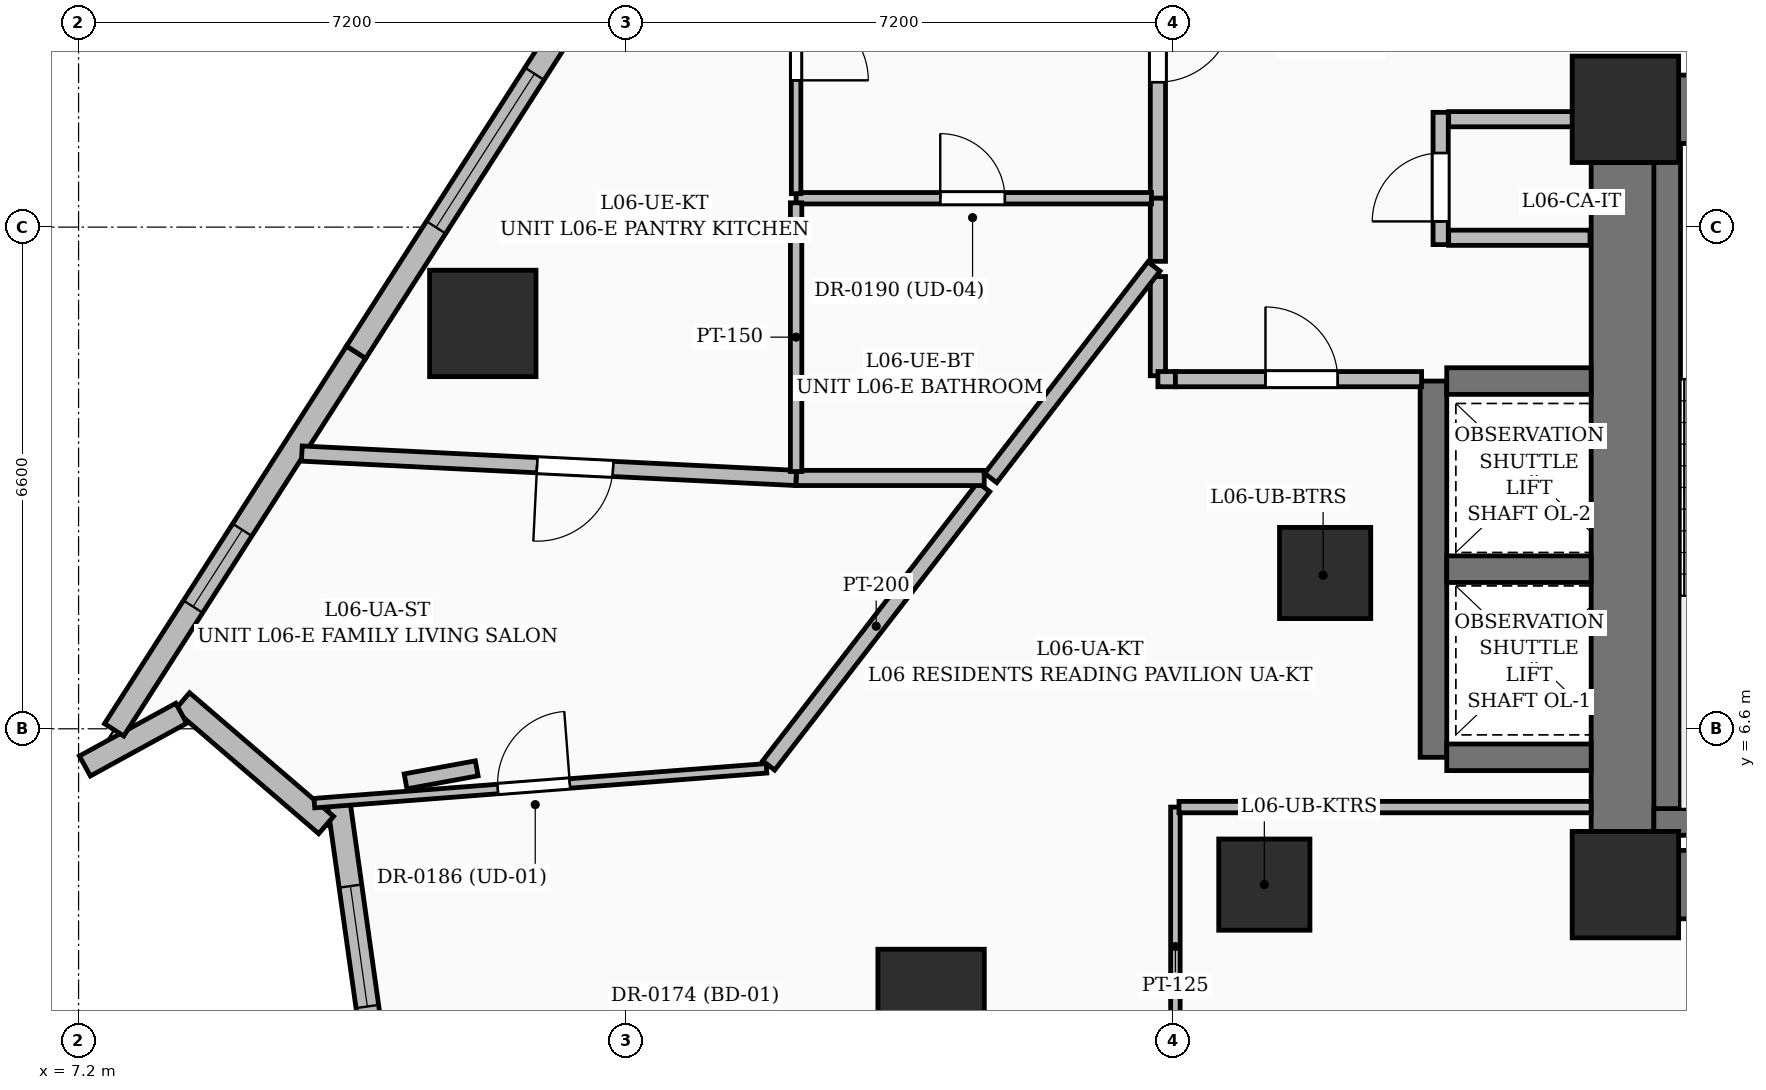
"""IFC4 building model, lengths in metres.
Left out: names, types, materials, properties, quantities, classifications, styles, units other than length and angle.
Written with IfcOpenShell. Run it as: python <this file> out.ifc"""

import sys

from ifc_helpers import new_model, si_unit, direction, frame, frame_2d, origin, origin_2d, place, context, subcontext, project, spatial, rectangle, extrude, element, fill, save


model = new_model("IFC4")
c1 = context("Model", 3, precision=1e-05, world=origin(), true_north=direction((0.0, 1.0)))
c2 = subcontext(c1, "Body", "Model", "MODEL_VIEW")
j1 = project(units=[si_unit("LENGTHUNIT", "METRE"), si_unit("PLANEANGLEUNIT", "RADIAN")], contexts=[c1])
p1 = place(None, origin())
s1 = spatial("IfcSite", under=j1, at=p1, CompositionType="ELEMENT")
p2 = place(p1, origin())
s2 = spatial("IfcBuilding", under=s1, at=p2, CompositionType="ELEMENT")
p3 = place(p2, frame((0.0, 0.0, 31.8)))
s3 = spatial("IfcBuildingStorey", under=s2, at=p3, CompositionType="ELEMENT", Elevation=31.8)
for number, where, z_axis, x_axis in (
    (1, (27.55, 4.55, 0.0), (0.0, 0.0, 1.0), (1.0, 0.0, 0.0)),
    (2, (27.55, 14.75, 0.0), (0.0, 0.0, 1.0), (1.0, 0.0, 0.0)),
):
    element("IfcColumn", number, at=place(p3, frame(where, z_axis=z_axis, x_axis=x_axis)), inside=s3, PredefinedType="COLUMN", context=c2, shape_type="SweptSolid", body=[
        extrude(rectangle(XDim=1.4, YDim=1.4, at=origin_2d()), origin(), (0.0, 0.0, 1.0), 3.6),
    ])
for number, where, z_axis, x_axis in (
    (3, (22.8, 4.55, 0.0), (0.0, 0.0, 1.0), (1.0, 0.0, 0.0)),
    (4, (23.6, 8.65, 0.0), (0.0, 0.0, 1.0), (1.0, 0.0, 0.0)),
):
    element("IfcColumn", number, at=place(p3, frame(where, z_axis=z_axis, x_axis=x_axis)), inside=s3, PredefinedType="COLUMN", context=c2, shape_type="SweptSolid", body=[
        extrude(rectangle(XDim=1.2, YDim=1.2, at=origin_2d()), origin(), (0.0, 0.0, 1.0), 3.6),
    ])
p4 = place(p3, frame((28.25, 4.55, 0.0), z_axis=(0.0, 0.0, 1.0), x_axis=(1.0, 0.0, 0.0)))
e5 = element("IfcWall", 5, at=p4, inside=s3, PredefinedType="SHEAR", context=c2, shape_type="SweptSolid", body=[
    extrude(rectangle(XDim=6.2, YDim=0.9, at=frame_2d((3.1, 0.0))), origin(), (0.0, 0.0, 1.0), 3.6),
])
p5 = place(p3, frame((28.25, 14.75, 0.0), z_axis=(0.0, 0.0, 1.0), x_axis=(1.0, 0.0, 0.0)))
e6 = element("IfcWall", 6, at=p5, inside=s3, PredefinedType="SHEAR", context=c2, shape_type="SweptSolid", body=[
    extrude(rectangle(XDim=6.2, YDim=0.9, at=frame_2d((3.1, 0.0))), origin(), (0.0, 0.0, 1.0), 3.6),
])
p6 = place(p5, frame((0.925, 0.0, 0.0)))
e7 = element("IfcOpeningElement", 7, at=p6, cuts=e6, PredefinedType="OPENING", context=c2, shape_type="SweptSolid", body=[
    extrude(rectangle(XDim=1.05, YDim=2.15, at=frame_2d((0.525, 1.075))), frame((0.0, 0.46, 0.0), z_axis=(0.0, -1.0, 0.0), x_axis=(1.0, 0.0, 0.0)), (0.0, 0.0, 1.0), 0.92),
])
p7 = place(p3, frame((27.55, 5.25, 0.0), z_axis=(0.0, 0.0, 1.0), x_axis=(0.0, 1.0, 0.0)))
e8 = element("IfcWall", 8, at=p7, inside=s3, PredefinedType="SHEAR", context=c2, shape_type="SweptSolid", body=[
    extrude(rectangle(XDim=8.8, YDim=0.9, at=frame_2d((4.4, 0.0))), origin(), (0.0, 0.0, 1.0), 3.6),
])
p8 = place(p3, frame((28.1, 5.2, 0.0), z_axis=(0.0, 0.0, 1.0), x_axis=(0.0, 1.0, 0.0)))
e9 = element("IfcWall", 9, at=p8, inside=s3, PredefinedType="SOLIDWALL", context=c2, shape_type="SweptSolid", body=[
    extrude(rectangle(XDim=9.1, YDim=0.35, at=frame_2d((4.55, 0.0))), origin(), (0.0, 0.0, 1.0), 3.6),
])
p9 = place(p3, frame((27.925, 5.375, 0.0), z_axis=(0.0, 0.0, 1.0), x_axis=(1.0, 0.0, 0.0)))
e10 = element("IfcWall", 10, at=p9, inside=s3, PredefinedType="SOLIDWALL", context=c2, shape_type="SweptSolid", body=[
    extrude(rectangle(XDim=3.55, YDim=0.35, at=frame_2d((1.775, 0.0))), origin(), (0.0, 0.0, 1.0), 3.6),
])
p10 = place(p3, frame((25.025, 6.225, 0.0), z_axis=(0.0, 0.0, 1.0), x_axis=(0.0, 1.0, 0.0)))
e11 = element("IfcWall", 11, at=p10, inside=s3, PredefinedType="SOLIDWALL", context=c2, shape_type="SweptSolid", body=[
    extrude(rectangle(XDim=4.95, YDim=0.35, at=frame_2d((2.475, 0.0))), origin(), (0.0, 0.0, 1.0), 3.6),
])
for number, where, z_axis, x_axis in (
    (12, (25.2, 6.225, 0.0), (0.0, 0.0, 1.0), (1.0, 0.0, 0.0)),
    (13, (25.2, 8.7, 0.0), (0.0, 0.0, 1.0), (1.0, 0.0, 0.0)),
    (14, (25.2, 11.175, 0.0), (0.0, 0.0, 1.0), (1.0, 0.0, 0.0)),
):
    element("IfcWall", number, at=place(p3, frame(where, z_axis=z_axis, x_axis=x_axis)), inside=s3, PredefinedType="SOLIDWALL", context=c2, shape_type="SweptSolid", body=[
        extrude(rectangle(XDim=1.9, YDim=0.35, at=frame_2d((0.95, 0.0))), origin(), (0.0, 0.0, 1.0), 3.6),
    ])
for number, where, z_axis, x_axis in (
    (15, (18.416, 3.0, 0.0), (0.0, 0.0, 1.0), (1.0, 0.0, 0.0)),
    (16, (12.518, 11.933, 0.0), (0.0, 0.0, 1.0), (1.0, 0.0, 0.0)),
):
    element("IfcColumn", number, at=place(p3, frame(where, z_axis=z_axis, x_axis=x_axis)), inside=s3, PredefinedType="COLUMN", context=c2, shape_type="SweptSolid", body=[
        extrude(rectangle(XDim=1.4, YDim=1.4, at=origin_2d()), origin(), (0.0, 0.0, 1.0), 3.6),
    ])
p11 = place(p3, frame((11.044, 2.625, 0.0), z_axis=(0.0, 0.0, 1.0), x_axis=(-0.139123594989, 0.99027502509, 0.0)))
e17 = element("IfcWall", 17, at=p11, inside=s3, PredefinedType="SOLIDWALL", context=c2, shape_type="SweptSolid", body=[
    extrude(rectangle(XDim=3.05, YDim=0.3, at=frame_2d((1.525, 0.0))), origin(), (0.0, 0.0, 1.0), 3.35),
])
p12 = place(p11, frame((0.325, 0.0, 0.55)))
e18 = element("IfcOpeningElement", 18, at=p12, cuts=e17, PredefinedType="OPENING", context=c2, shape_type="SweptSolid", body=[
    extrude(rectangle(XDim=1.6, YDim=2.2, at=frame_2d((0.8, 1.1))), frame((0.0, 0.16, 0.0), z_axis=(0.0, -1.0, 0.0), x_axis=(1.0, 0.0, 0.0)), (0.0, 0.0, 1.0), 0.32),
])
p13 = place(p3, frame((10.457, 5.334, 0.0), z_axis=(0.0, 0.0, 1.0), x_axis=(-0.758710972352, 0.651427402273, 0.0)))
e19 = element("IfcWall", 19, at=p13, inside=s3, PredefinedType="SOLIDWALL", context=c2, shape_type="SweptSolid", body=[
    extrude(rectangle(XDim=2.496, YDim=0.3, at=frame_2d((1.248, 0.0))), origin(), (0.0, 0.0, 1.0), 3.35),
])
p14 = place(p3, frame((8.551, 6.804, 0.0), z_axis=(0.0, 0.0, 1.0), x_axis=(-0.877287752989, -0.479964788767, 0.0)))
e20 = element("IfcWall", 20, at=p14, inside=s3, PredefinedType="SOLIDWALL", context=c2, shape_type="SweptSolid", body=[
    extrude(rectangle(XDim=1.445, YDim=0.3, at=frame_2d((0.722, 0.0))), origin(), (0.0, 0.0, 1.0), 3.35),
])
p15 = place(p3, frame((7.668, 6.586, 0.0), z_axis=(0.0, 0.0, 1.0), x_axis=(0.539504449159, 0.841982748836, 0.0)))
e21 = element("IfcWall", 21, at=p15, inside=s3, PredefinedType="SOLIDWALL", context=c2, shape_type="SweptSolid", body=[
    extrude(rectangle(XDim=5.901, YDim=0.3, at=frame_2d((2.95, 0.0))), origin(), (0.0, 0.0, 1.0), 3.35),
])
p16 = place(p15, frame((1.925, 0.0, 0.8)))
e22 = element("IfcOpeningElement", 22, at=p16, cuts=e21, PredefinedType="OPENING", context=c2, shape_type="SweptSolid", body=[
    extrude(rectangle(XDim=1.2, YDim=1.8, at=frame_2d((0.6, 0.9))), frame((0.0, 0.16, 0.0), z_axis=(0.0, -1.0, 0.0), x_axis=(1.0, 0.0, 0.0)), (0.0, 0.0, 1.0), 0.32),
])
p17 = place(p3, frame((10.851, 11.555, 0.0), z_axis=(0.0, 0.0, 1.0), x_axis=(0.539526045631, 0.841968910403, 0.0)))
e23 = element("IfcWall", 23, at=p17, inside=s3, PredefinedType="SOLIDWALL", context=c2, shape_type="SweptSolid", body=[
    extrude(rectangle(XDim=6.526, YDim=0.3, at=frame_2d((3.263, 0.0))), origin(), (0.0, 0.0, 1.0), 3.35),
])
p18 = place(p17, frame((1.95, 0.0, 0.6)))
e24 = element("IfcOpeningElement", 24, at=p18, cuts=e23, PredefinedType="OPENING", context=c2, shape_type="SweptSolid", body=[
    extrude(rectangle(XDim=2.4, YDim=2.1, at=frame_2d((1.2, 1.05))), frame((0.0, 0.16, 0.0), z_axis=(0.0, -1.0, 0.0), x_axis=(1.0, 0.0, 0.0)), (0.0, 0.0, 1.0), 0.32),
])
p19 = place(p3, frame((25.12, 12.97, 0.0), z_axis=(0.0, 0.0, 1.0), x_axis=(0.0, 1.0, 0.0)))
e25 = element("IfcWall", 25, at=p19, inside=s3, PredefinedType="PARTITIONING", context=c2, shape_type="SweptSolid", body=[
    extrude(rectangle(XDim=1.74, YDim=0.2, at=frame_2d((0.87, 0.0))), origin(), (0.0, 0.0, 1.0), 3.35),
])
p20 = place(p19, frame((0.305, 0.0, 0.0)))
e26 = element("IfcOpeningElement", 26, at=p20, cuts=e25, PredefinedType="OPENING", context=c2, shape_type="SweptSolid", body=[
    extrude(rectangle(XDim=0.9, YDim=2.1, at=frame_2d((0.45, 1.05))), frame((0.0, 0.11, 0.0), z_axis=(0.0, -1.0, 0.0), x_axis=(1.0, 0.0, 0.0)), (0.0, 0.0, 1.0), 0.22),
])
for number, where, z_axis, x_axis in (
    (27, (25.225, 14.62, 0.0), (0.0, 0.0, 1.0), (1.0, 0.0, 0.0)),
    (28, (25.225, 13.06, 0.0), (0.0, 0.0, 1.0), (1.0, 0.0, 0.0)),
):
    element("IfcWall", number, at=place(p3, frame(where, z_axis=z_axis, x_axis=x_axis)), inside=s3, PredefinedType="PARTITIONING", context=c2, shape_type="SweptSolid", body=[
        extrude(rectangle(XDim=1.86, YDim=0.2, at=frame_2d((0.93, 0.0))), origin(), (0.0, 0.0, 1.0), 3.35),
    ])
p21 = place(p3, frame((21.4, 12.55, 0.0), z_axis=(0.0, 0.0, 1.0), x_axis=(0.0, -1.0, 0.0)))
e29 = element("IfcWall", 29, at=p21, inside=s3, PredefinedType="PARTITIONING", context=c2, shape_type="SweptSolid", body=[
    extrude(rectangle(XDim=1.305, YDim=0.2, at=frame_2d((0.652, 0.0))), origin(), (0.0, 0.0, 1.0), 3.35),
])
p22 = place(p3, frame((21.4, 11.2, 0.0), z_axis=(0.0, 0.0, 1.0), x_axis=(1.0, 0.0, 0.0)))
e30 = element("IfcWall", 30, at=p22, inside=s3, PredefinedType="PARTITIONING", context=c2, shape_type="SweptSolid", body=[
    extrude(rectangle(XDim=0.23, YDim=0.2, at=frame_2d((0.115, 0.0))), origin(), (0.0, 0.0, 1.0), 2.709),
])
p23 = place(p3, frame((21.63, 11.2, 0.0), z_axis=(0.0, 0.0, 1.0), x_axis=(1.0, 0.0, 0.0)))
e31 = element("IfcWall", 31, at=p23, inside=s3, PredefinedType="PARTITIONING", context=c2, shape_type="SweptSolid", body=[
    extrude(rectangle(XDim=3.239, YDim=0.2, at=frame_2d((1.62, 0.0))), origin(), (0.0, 0.0, 1.0), 2.709),
])
p24 = place(p23, frame((1.185, 0.0, 0.0)))
e32 = element("IfcOpeningElement", 32, at=p24, cuts=e31, PredefinedType="OPENING", context=c2, shape_type="SweptSolid", body=[
    extrude(rectangle(XDim=0.95, YDim=2.2, at=frame_2d((0.475, 1.1))), frame((0.0, 0.11, 0.0), z_axis=(0.0, -1.0, 0.0), x_axis=(1.0, 0.0, 0.0)), (0.0, 0.0, 1.0), 0.22),
])
p25 = place(p3, frame((21.4, 17.75, 0.0), z_axis=(0.0, 0.0, 1.0), x_axis=(0.0, -1.0, 0.0)))
e33 = element("IfcWall", 33, at=p25, inside=s3, PredefinedType="PARTITIONING", context=c2, shape_type="SweptSolid", body=[
    extrude(rectangle(XDim=4.17, YDim=0.2, at=frame_2d((2.085, 0.0))), origin(), (0.0, 0.0, 1.0), 2.709),
])
p26 = place(p25, frame((1.643, 0.0, 0.0)))
e34 = element("IfcOpeningElement", 34, at=p26, cuts=e33, PredefinedType="OPENING", context=c2, shape_type="SweptSolid", body=[
    extrude(rectangle(XDim=1.0, YDim=2.2, at=frame_2d((0.5, 1.1))), frame((0.0, 0.11, 0.0), z_axis=(0.0, -1.0, 0.0), x_axis=(1.0, 0.0, 0.0)), (0.0, 0.0, 1.0), 0.22),
])
p27 = place(p3, frame((21.4, 13.58, 0.0), z_axis=(0.0, 0.0, 1.0), x_axis=(0.0, -1.0, 0.0)))
e35 = element("IfcWall", 35, at=p27, inside=s3, PredefinedType="PARTITIONING", context=c2, shape_type="SweptSolid", body=[
    extrude(rectangle(XDim=0.83, YDim=0.2, at=frame_2d((0.415, 0.0))), origin(), (0.0, 0.0, 1.0), 3.35),
])
p28 = place(p3, frame((10.302, 5.622, 0.0), z_axis=(0.0, 0.0, 1.0), x_axis=(0.997048464094, 0.076774737046, 0.0)))
e36 = element("IfcWall", 36, at=p28, inside=s3, PredefinedType="PARTITIONING", context=c2, shape_type="SweptSolid", body=[
    extrude(rectangle(XDim=5.966, YDim=0.125, at=frame_2d((2.983, 0.0))), origin(), (0.0, 0.0, 1.0), 2.37),
])
p29 = place(p28, frame((2.421, 0.0, 0.0)))
e37 = element("IfcOpeningElement", 37, at=p29, cuts=e36, PredefinedType="OPENING", context=c2, shape_type="SweptSolid", body=[
    extrude(rectangle(XDim=0.95, YDim=2.2, at=frame_2d((0.475, 1.1))), frame((0.0, 0.072, 0.0), z_axis=(0.0, -1.0, 0.0), x_axis=(1.0, 0.0, 0.0)), (0.0, 0.0, 1.0), 0.145),
])
p30 = place(p3, frame((16.279, 6.118, 0.0), z_axis=(0.0, 0.0, 1.0), x_axis=(0.611231323246, 0.791452000745, 0.0)))
e38 = element("IfcWall", 38, at=p30, inside=s3, PredefinedType="PARTITIONING", context=c2, shape_type="SweptSolid", body=[
    extrude(rectangle(XDim=4.629, YDim=0.2, at=frame_2d((2.314, 0.0))), origin(), (0.0, 0.0, 1.0), 2.228),
])
p31 = place(p3, frame((19.115, 9.9, 0.0), z_axis=(0.0, 0.0, 1.0), x_axis=(-1.0, 0.0, 0.0)))
e39 = element("IfcWall", 39, at=p31, inside=s3, PredefinedType="PARTITIONING", context=c2, shape_type="SweptSolid", body=[
    extrude(rectangle(XDim=2.475, YDim=0.2, at=frame_2d((1.238, 0.0))), origin(), (0.0, 0.0, 1.0), 2.228),
])
p32 = place(p3, frame((16.64, 9.9, 0.0), z_axis=(0.0, 0.0, 1.0), x_axis=(-0.998783560552, 0.049309219933, 0.0)))
e40 = element("IfcWall", 40, at=p32, inside=s3, PredefinedType="PARTITIONING", context=c2, shape_type="SweptSolid", body=[
    extrude(rectangle(XDim=6.511, YDim=0.2, at=frame_2d((3.255, 0.0))), origin(), (0.0, 0.0, 1.0), 2.37),
])
p33 = place(p32, frame((2.412, 0.0, 0.0)))
e41 = element("IfcOpeningElement", 41, at=p33, cuts=e40, PredefinedType="OPENING", context=c2, shape_type="SweptSolid", body=[
    extrude(rectangle(XDim=1.0, YDim=2.2, at=frame_2d((0.5, 1.1))), frame((0.0, 0.11, 0.0), z_axis=(0.0, -1.0, 0.0), x_axis=(1.0, 0.0, 0.0)), (0.0, 0.0, 1.0), 0.22),
])
p34 = place(p3, frame((21.63, 1.9, 0.0), z_axis=(0.0, 0.0, 1.0), x_axis=(0.0, 1.0, 0.0)))
e42 = element("IfcWall", 42, at=p34, inside=s3, PredefinedType="PARTITIONING", context=c2, shape_type="SweptSolid", body=[
    extrude(rectangle(XDim=3.67, YDim=0.125, at=frame_2d((1.835, 0.0))), origin(), (0.0, 0.0, 1.0), 2.228),
])
p35 = place(p3, frame((21.348, 12.683, 0.0), z_axis=(0.0, 0.0, 1.0), x_axis=(-0.611075844668, -0.791572051088, 0.0)))
e43 = element("IfcWall", 43, at=p35, inside=s3, PredefinedType="PARTITIONING", context=c2, shape_type="SweptSolid", body=[
    extrude(rectangle(XDim=3.515, YDim=0.2, at=frame_2d((1.758, 0.0))), origin(), (0.0, 0.0, 1.0), 2.228),
])
p36 = place(p3, frame((21.677, 5.57, 0.0), z_axis=(0.0, 0.0, 1.0), x_axis=(1.0, 0.0, 0.0)))
e44 = element("IfcWall", 44, at=p36, inside=s3, PredefinedType="PARTITIONING", context=c2, shape_type="SweptSolid", body=[
    extrude(rectangle(XDim=0.903, YDim=0.15, at=frame_2d((0.451, 0.0))), origin(), (0.0, 0.0, 1.0), 3.35),
])
p37 = place(p3, frame((23.02, 5.57, 0.0), z_axis=(0.0, 0.0, 1.0), x_axis=(1.0, 0.0, 0.0)))
e45 = element("IfcWall", 45, at=p37, inside=s3, PredefinedType="PARTITIONING", context=c2, shape_type="SweptSolid", body=[
    extrude(rectangle(XDim=4.08, YDim=0.15, at=frame_2d((2.04, 0.0))), origin(), (0.0, 0.0, 1.0), 3.35),
])
p38 = place(p3, frame((16.64, 13.58, 0.0), z_axis=(0.0, 0.0, 1.0), x_axis=(1.0, 0.0, 0.0)))
e46 = element("IfcWall", 46, at=p38, inside=s3, PredefinedType="PARTITIONING", context=c2, shape_type="SweptSolid", body=[
    extrude(rectangle(XDim=4.675, YDim=0.15, at=frame_2d((2.337, 0.0))), origin(), (0.0, 0.0, 1.0), 2.709),
])
p39 = place(p38, frame((1.896, 0.0, 0.0)))
e47 = element("IfcOpeningElement", 47, at=p39, cuts=e46, PredefinedType="OPENING", context=c2, shape_type="SweptSolid", body=[
    extrude(rectangle(XDim=0.85, YDim=2.1, at=frame_2d((0.425, 1.05))), frame((0.0, 0.085, 0.0), z_axis=(0.0, -1.0, 0.0), x_axis=(1.0, 0.0, 0.0)), (0.0, 0.0, 1.0), 0.17),
])
p40 = place(p3, frame((16.64, 17.75, 0.0), z_axis=(0.0, 0.0, 1.0), x_axis=(0.0, -1.0, 0.0)))
e48 = element("IfcWall", 48, at=p40, inside=s3, PredefinedType="PARTITIONING", context=c2, shape_type="SweptSolid", body=[
    extrude(rectangle(XDim=4.11, YDim=0.125, at=frame_2d((2.055, 0.0))), origin(), (0.0, 0.0, 1.0), 3.35),
])
p41 = place(p40, frame((1.669, 0.0, 0.0)))
e49 = element("IfcOpeningElement", 49, at=p41, cuts=e48, PredefinedType="OPENING", context=c2, shape_type="SweptSolid", body=[
    extrude(rectangle(XDim=0.95, YDim=2.2, at=frame_2d((0.475, 1.1))), frame((0.0, 0.072, 0.0), z_axis=(0.0, -1.0, 0.0), x_axis=(1.0, 0.0, 0.0)), (0.0, 0.0, 1.0), 0.145),
])
p42 = place(p3, frame((16.64, 13.52, 0.0), z_axis=(0.0, 0.0, 1.0), x_axis=(0.0, -1.0, 0.0)))
e50 = element("IfcWall", 50, at=p42, inside=s3, PredefinedType="PARTITIONING", context=c2, shape_type="SweptSolid", body=[
    extrude(rectangle(XDim=3.535, YDim=0.15, at=frame_2d((1.768, 0.0))), origin(), (0.0, 0.0, 1.0), 2.228),
])
p43 = place(p3, frame((11.502, 5.908, 0.0), z_axis=(0.0, 0.0, 1.0), x_axis=(0.983510869315, 0.180849025265, 0.0)))
e51 = element("IfcWall", 51, at=p43, inside=s3, PredefinedType="PARTITIONING", context=c2, shape_type="SweptSolid", body=[
    extrude(rectangle(XDim=0.952, YDim=0.2, at=frame_2d((0.476, 0.0))), origin(), (0.0, 0.0, 1.0), 3.35),
])
p44 = place(p12, origin())
e52 = element("IfcWindow", 52, at=p44, inside=s3, PartitioningType="SINGLE_PANEL", PredefinedType="WINDOW", context=c2, shape_type="SweptSolid", body=[
    extrude(rectangle(XDim=1.6, YDim=2.2, at=frame_2d((0.8, 1.1))), frame((0.0, 0.03, 0.0), z_axis=(0.0, -1.0, 0.0), x_axis=(1.0, 0.0, 0.0)), (0.0, 0.0, 1.0), 0.06),
])
fill(e18, e52)
p45 = place(p16, origin())
e53 = element("IfcWindow", 53, at=p45, inside=s3, PartitioningType="SINGLE_PANEL", PredefinedType="WINDOW", context=c2, shape_type="SweptSolid", body=[
    extrude(rectangle(XDim=1.2, YDim=1.8, at=frame_2d((0.6, 0.9))), frame((0.0, 0.03, 0.0), z_axis=(0.0, -1.0, 0.0), x_axis=(1.0, 0.0, 0.0)), (0.0, 0.0, 1.0), 0.06),
])
fill(e22, e53)
p46 = place(p18, origin())
e54 = element("IfcWindow", 54, at=p46, inside=s3, PartitioningType="SINGLE_PANEL", PredefinedType="WINDOW", context=c2, shape_type="SweptSolid", body=[
    extrude(rectangle(XDim=2.4, YDim=2.1, at=frame_2d((1.2, 1.05))), frame((0.0, 0.03, 0.0), z_axis=(0.0, -1.0, 0.0), x_axis=(1.0, 0.0, 0.0)), (0.0, 0.0, 1.0), 0.06),
])
fill(e24, e54)
p47 = place(p20, origin())
e55 = element("IfcDoor", 55, at=p47, inside=s3, OperationType="SINGLE_SWING_LEFT", PredefinedType="DOOR", context=c2, shape_type="SweptSolid", body=[
    extrude(rectangle(XDim=0.9, YDim=2.1, at=frame_2d((0.45, 1.05))), frame((0.0, 0.025, 0.0), z_axis=(0.0, -1.0, 0.0), x_axis=(1.0, 0.0, 0.0)), (0.0, 0.0, 1.0), 0.05),
])
fill(e26, e55)
p48 = place(p29, origin())
e56 = element("IfcDoor", 56, at=p48, inside=s3, OperationType="SINGLE_SWING_RIGHT", PredefinedType="DOOR", context=c2, shape_type="SweptSolid", body=[
    extrude(rectangle(XDim=0.95, YDim=2.2, at=frame_2d((0.475, 1.1))), frame((0.0, 0.025, 0.0), z_axis=(0.0, -1.0, 0.0), x_axis=(1.0, 0.0, 0.0)), (0.0, 0.0, 1.0), 0.05),
])
fill(e37, e56)
p49 = place(p26, origin())
e57 = element("IfcDoor", 57, at=p49, inside=s3, OperationType="SINGLE_SWING_LEFT", PredefinedType="DOOR", context=c2, shape_type="SweptSolid", body=[
    extrude(rectangle(XDim=1.0, YDim=2.2, at=frame_2d((0.5, 1.1))), frame((0.0, 0.025, 0.0), z_axis=(0.0, -1.0, 0.0), x_axis=(1.0, 0.0, 0.0)), (0.0, 0.0, 1.0), 0.05),
])
fill(e34, e57)
p50 = place(p41, origin())
e58 = element("IfcDoor", 58, at=p50, inside=s3, OperationType="SINGLE_SWING_RIGHT", PredefinedType="DOOR", context=c2, shape_type="SweptSolid", body=[
    extrude(rectangle(XDim=0.95, YDim=2.2, at=frame_2d((0.475, 1.1))), frame((0.0, 0.025, 0.0), z_axis=(0.0, -1.0, 0.0), x_axis=(1.0, 0.0, 0.0)), (0.0, 0.0, 1.0), 0.05),
])
fill(e49, e58)
p51 = place(p39, origin())
e59 = element("IfcDoor", 59, at=p51, inside=s3, OperationType="SINGLE_SWING_LEFT", PredefinedType="DOOR", context=c2, shape_type="SweptSolid", body=[
    extrude(rectangle(XDim=0.85, YDim=2.1, at=frame_2d((0.425, 1.05))), frame((0.0, 0.025, 0.0), z_axis=(0.0, -1.0, 0.0), x_axis=(1.0, 0.0, 0.0)), (0.0, 0.0, 1.0), 0.05),
])
fill(e47, e59)
p52 = place(p33, origin())
e60 = element("IfcDoor", 60, at=p52, inside=s3, OperationType="SINGLE_SWING_RIGHT", PredefinedType="DOOR", context=c2, shape_type="SweptSolid", body=[
    extrude(rectangle(XDim=1.0, YDim=2.2, at=frame_2d((0.5, 1.1))), frame((0.0, 0.025, 0.0), z_axis=(0.0, -1.0, 0.0), x_axis=(1.0, 0.0, 0.0)), (0.0, 0.0, 1.0), 0.05),
])
fill(e41, e60)
p53 = place(p24, origin())
e61 = element("IfcDoor", 61, at=p53, inside=s3, OperationType="SINGLE_SWING_LEFT", PredefinedType="DOOR", context=c2, shape_type="SweptSolid", body=[
    extrude(rectangle(XDim=0.95, YDim=2.2, at=frame_2d((0.475, 1.1))), frame((0.0, 0.025, 0.0), z_axis=(0.0, -1.0, 0.0), x_axis=(1.0, 0.0, 0.0)), (0.0, 0.0, 1.0), 0.05),
])
fill(e32, e61)
save(model, sys.argv[1])
